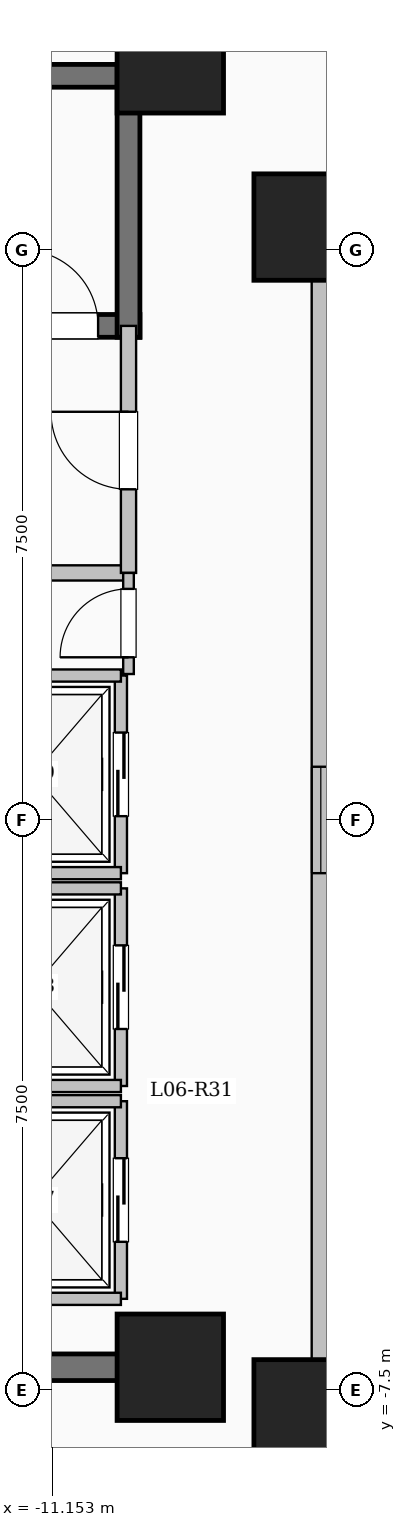
"""IFC4 building model, lengths in metres.
Left out: names, types, materials, properties, quantities, classifications, styles, units other than length and angle.
Written with IfcOpenShell. Run it as: python <this file> out.ifc"""

import sys

from ifc_helpers import new_model, si_unit, direction, frame, frame_2d, origin, origin_2d, place, context, subcontext, project, spatial, rectangle, extrude, element, fill, save


model = new_model("IFC4")
c1 = context("Model", 3, precision=1e-05, world=origin(), true_north=direction((0.0, 1.0)))
c2 = subcontext(c1, "Body", "Model", "MODEL_VIEW")
j1 = project(units=[si_unit("LENGTHUNIT", "METRE"), si_unit("PLANEANGLEUNIT", "RADIAN")], contexts=[c1])
p1 = place(None, origin())
s1 = spatial("IfcSite", under=j1, at=p1, CompositionType="ELEMENT")
p2 = place(p1, origin())
s2 = spatial("IfcBuilding", under=s1, at=p2, CompositionType="ELEMENT")
p3 = place(p2, frame((0.0, 0.0, 27.35)))
s3 = spatial("IfcBuildingStorey", under=s2, at=p3, CompositionType="ELEMENT", Elevation=27.35)
for number, where, z_axis, x_axis in (
    (1, (-7.8, -7.8, 0.0), (0.0, 0.0, 1.0), (1.0, 0.0, 0.0)),
    (2, (-7.8, 7.8, 0.0), (0.0, 0.0, 1.0), (1.0, 0.0, 0.0)),
    (3, (-9.6, -7.2, 0.0), (0.0, 0.0, 1.0), (1.0, 0.0, 0.0)),
    (4, (-9.6, 10.0, 0.0), (0.0, 0.0, 1.0), (1.0, 0.0, 0.0)),
):
    element("IfcColumn", number, at=place(p3, frame(where, z_axis=z_axis, x_axis=x_axis)), inside=s3, PredefinedType="COLUMN", context=c2, shape_type="SweptSolid", body=[
        extrude(rectangle(XDim=1.4, YDim=1.4, at=origin_2d()), origin(), (0.0, 0.0, 1.0), 3.35),
    ])
p4 = place(p3, frame((-7.62, -7.62, 0.0), z_axis=(0.0, 0.0, 1.0), x_axis=(1.0, 0.0, 0.0)))
e5 = element("IfcWall", 5, at=p4, inside=s3, PredefinedType="SOLIDWALL", context=c2, shape_type="SweptSolid", body=[
    extrude(rectangle(XDim=15.24, YDim=0.24, at=frame_2d((7.62, 0.0))), origin(), (0.0, 0.0, 1.0), 3.1),
])
p5 = place(p4, frame((6.92, 0.0, 0.95)))
e6 = element("IfcOpeningElement", 6, at=p5, cuts=e5, PredefinedType="OPENING", context=c2, shape_type="SweptSolid", body=[
    extrude(rectangle(XDim=1.4, YDim=1.5, at=frame_2d((0.7, 0.75))), frame((0.0, 0.13, 0.0), z_axis=(0.0, -1.0, 0.0), x_axis=(1.0, 0.0, 0.0)), (0.0, 0.0, 1.0), 0.26),
])
p6 = place(p3, frame((7.62, 7.62, 0.0), z_axis=(0.0, 0.0, 1.0), x_axis=(-1.0, 0.0, 0.0)))
e7 = element("IfcWall", 7, at=p6, inside=s3, PredefinedType="SOLIDWALL", context=c2, shape_type="SweptSolid", body=[
    extrude(rectangle(XDim=15.24, YDim=0.24, at=frame_2d((7.62, 0.0))), origin(), (0.0, 0.0, 1.0), 3.1),
])
p7 = place(p6, frame((6.92, 0.0, 0.95)))
e8 = element("IfcOpeningElement", 8, at=p7, cuts=e7, PredefinedType="OPENING", context=c2, shape_type="SweptSolid", body=[
    extrude(rectangle(XDim=1.4, YDim=1.5, at=frame_2d((0.7, 0.75))), frame((0.0, 0.13, 0.0), z_axis=(0.0, -1.0, 0.0), x_axis=(1.0, 0.0, 0.0)), (0.0, 0.0, 1.0), 0.26),
])
p8 = place(p3, frame((-7.62, 7.62, 0.0), z_axis=(0.0, 0.0, 1.0), x_axis=(0.0, -1.0, 0.0)))
e9 = element("IfcWall", 9, at=p8, inside=s3, PredefinedType="SOLIDWALL", context=c2, shape_type="SweptSolid", body=[
    extrude(rectangle(XDim=15.24, YDim=0.24, at=frame_2d((7.62, 0.0))), origin(), (0.0, 0.0, 1.0), 3.1),
])
p9 = place(p8, frame((6.92, 0.0, 0.95)))
e10 = element("IfcOpeningElement", 10, at=p9, cuts=e9, PredefinedType="OPENING", context=c2, shape_type="SweptSolid", body=[
    extrude(rectangle(XDim=1.4, YDim=1.5, at=frame_2d((0.7, 0.75))), frame((0.0, 0.13, 0.0), z_axis=(0.0, -1.0, 0.0), x_axis=(1.0, 0.0, 0.0)), (0.0, 0.0, 1.0), 0.26),
])
p10 = place(p3, frame((-18.0, 9.79, 0.0), z_axis=(0.0, 0.0, 1.0), x_axis=(1.0, 0.0, 0.0)))
e11 = element("IfcWall", 11, at=p10, inside=s3, PredefinedType="SHEAR", context=c2, shape_type="SweptSolid", body=[
    extrude(rectangle(XDim=8.0, YDim=0.3, at=frame_2d((4.0, 0.0))), origin(), (0.0, 0.0, 1.0), 3.35),
])
p11 = place(p3, frame((-18.0, 6.5, 0.0), z_axis=(0.0, 0.0, 1.0), x_axis=(1.0, 0.0, 0.0)))
e12 = element("IfcWall", 12, at=p11, inside=s3, PredefinedType="SHEAR", context=c2, shape_type="SweptSolid", body=[
    extrude(rectangle(XDim=8.0, YDim=0.3, at=frame_2d((4.0, 0.0))), origin(), (0.0, 0.0, 1.0), 3.35),
])
p12 = place(p11, frame((6.45, 0.0, 0.0)))
e13 = element("IfcOpeningElement", 13, at=p12, cuts=e12, PredefinedType="OPENING", context=c2, shape_type="SweptSolid", body=[
    extrude(rectangle(XDim=1.0, YDim=2.15, at=frame_2d((0.5, 1.075))), frame((0.0, 0.16, 0.0), z_axis=(0.0, -1.0, 0.0), x_axis=(1.0, 0.0, 0.0)), (0.0, 0.0, 1.0), 0.32),
])
p13 = place(p3, frame((-10.15, 6.35, 0.0), z_axis=(0.0, 0.0, 1.0), x_axis=(0.0, 1.0, 0.0)))
e14 = element("IfcWall", 14, at=p13, inside=s3, PredefinedType="SHEAR", context=c2, shape_type="SweptSolid", body=[
    extrude(rectangle(XDim=3.59, YDim=0.3, at=frame_2d((1.795, 0.0))), origin(), (0.0, 0.0, 1.0), 3.35),
])
p14 = place(p3, frame((-15.55, 3.25, 0.0), z_axis=(0.0, 0.0, 1.0), x_axis=(1.0, 0.0, 0.0)))
e15 = element("IfcWall", 15, at=p14, inside=s3, PredefinedType="SOLIDWALL", context=c2, shape_type="SweptSolid", body=[
    extrude(rectangle(XDim=5.4, YDim=0.2, at=frame_2d((2.7, 0.0))), origin(), (0.0, 0.0, 1.0), 3.1),
])
p15 = place(p3, frame((-10.15, 3.25, 0.0), z_axis=(0.0, 0.0, 1.0), x_axis=(0.0, 1.0, 0.0)))
e16 = element("IfcWall", 16, at=p15, inside=s3, PredefinedType="SOLIDWALL", context=c2, shape_type="SweptSolid", body=[
    extrude(rectangle(XDim=3.25, YDim=0.2, at=frame_2d((1.625, 0.0))), origin(), (0.0, 0.0, 1.0), 3.1),
])
p16 = place(p15, frame((1.1, 0.0, 0.0)))
e17 = element("IfcOpeningElement", 17, at=p16, cuts=e16, PredefinedType="OPENING", context=c2, shape_type="SweptSolid", body=[
    extrude(rectangle(XDim=1.02, YDim=2.15, at=frame_2d((0.51, 1.075))), frame((0.0, 0.11, 0.0), z_axis=(0.0, -1.0, 0.0), x_axis=(1.0, 0.0, 0.0)), (0.0, 0.0, 1.0), 0.22),
])
p17 = place(p3, frame((-10.25, -6.3, 0.0), z_axis=(0.0, 0.0, 1.0), x_axis=(0.0, 1.0, 0.0)))
e18 = element("IfcWall", 18, at=p17, inside=s3, PredefinedType="SOLIDWALL", context=c2, shape_type="SweptSolid", body=[
    extrude(rectangle(XDim=2.6, YDim=0.16, at=frame_2d((1.3, 0.0))), origin(), (0.0, 0.0, 1.0), 3.1),
])
p18 = place(p17, frame((0.75, 0.0, 0.0)))
e19 = element("IfcOpeningElement", 19, at=p18, cuts=e18, PredefinedType="OPENING", context=c2, shape_type="SweptSolid", body=[
    extrude(rectangle(XDim=1.1, YDim=2.15, at=frame_2d((0.55, 1.075))), frame((0.0, 0.09, 0.0), z_axis=(0.0, -1.0, 0.0), x_axis=(1.0, 0.0, 0.0)), (0.0, 0.0, 1.0), 0.18),
])
for number, where, z_axis, x_axis in (
    (20, (-12.55, -6.3, 0.0), (0.0, 0.0, 1.0), (1.0, 0.0, 0.0)),
    (21, (-12.55, -3.7, 0.0), (0.0, 0.0, 1.0), (1.0, 0.0, 0.0)),
):
    element("IfcWall", number, at=place(p3, frame(where, z_axis=z_axis, x_axis=x_axis)), inside=s3, PredefinedType="SOLIDWALL", context=c2, shape_type="SweptSolid", body=[
        extrude(rectangle(XDim=2.3, YDim=0.16, at=frame_2d((1.15, 0.0))), origin(), (0.0, 0.0, 1.0), 3.1),
    ])
p19 = place(p3, frame((-10.25, -3.5, 0.0), z_axis=(0.0, 0.0, 1.0), x_axis=(0.0, 1.0, 0.0)))
e22 = element("IfcWall", 22, at=p19, inside=s3, PredefinedType="SOLIDWALL", context=c2, shape_type="SweptSolid", body=[
    extrude(rectangle(XDim=2.6, YDim=0.16, at=frame_2d((1.3, 0.0))), origin(), (0.0, 0.0, 1.0), 3.1),
])
p20 = place(p19, frame((0.75, 0.0, 0.0)))
e23 = element("IfcOpeningElement", 23, at=p20, cuts=e22, PredefinedType="OPENING", context=c2, shape_type="SweptSolid", body=[
    extrude(rectangle(XDim=1.1, YDim=2.15, at=frame_2d((0.55, 1.075))), frame((0.0, 0.09, 0.0), z_axis=(0.0, -1.0, 0.0), x_axis=(1.0, 0.0, 0.0)), (0.0, 0.0, 1.0), 0.18),
])
for number, where, z_axis, x_axis in (
    (24, (-12.55, -3.5, 0.0), (0.0, 0.0, 1.0), (1.0, 0.0, 0.0)),
    (25, (-12.55, -0.9, 0.0), (0.0, 0.0, 1.0), (1.0, 0.0, 0.0)),
):
    element("IfcWall", number, at=place(p3, frame(where, z_axis=z_axis, x_axis=x_axis)), inside=s3, PredefinedType="SOLIDWALL", context=c2, shape_type="SweptSolid", body=[
        extrude(rectangle(XDim=2.3, YDim=0.16, at=frame_2d((1.15, 0.0))), origin(), (0.0, 0.0, 1.0), 3.1),
    ])
p21 = place(p3, frame((-10.25, -0.7, 0.0), z_axis=(0.0, 0.0, 1.0), x_axis=(0.0, 1.0, 0.0)))
e26 = element("IfcWall", 26, at=p21, inside=s3, PredefinedType="SOLIDWALL", context=c2, shape_type="SweptSolid", body=[
    extrude(rectangle(XDim=2.6, YDim=0.16, at=frame_2d((1.3, 0.0))), origin(), (0.0, 0.0, 1.0), 3.1),
])
p22 = place(p21, frame((0.75, 0.0, 0.0)))
e27 = element("IfcOpeningElement", 27, at=p22, cuts=e26, PredefinedType="OPENING", context=c2, shape_type="SweptSolid", body=[
    extrude(rectangle(XDim=1.1, YDim=2.15, at=frame_2d((0.55, 1.075))), frame((0.0, 0.09, 0.0), z_axis=(0.0, -1.0, 0.0), x_axis=(1.0, 0.0, 0.0)), (0.0, 0.0, 1.0), 0.18),
])
for number, where, z_axis, x_axis in (
    (28, (-12.55, -0.7, 0.0), (0.0, 0.0, 1.0), (1.0, 0.0, 0.0)),
    (29, (-12.55, 1.9, 0.0), (0.0, 0.0, 1.0), (1.0, 0.0, 0.0)),
):
    element("IfcWall", number, at=place(p3, frame(where, z_axis=z_axis, x_axis=x_axis)), inside=s3, PredefinedType="SOLIDWALL", context=c2, shape_type="SweptSolid", body=[
        extrude(rectangle(XDim=2.3, YDim=0.16, at=frame_2d((1.15, 0.0))), origin(), (0.0, 0.0, 1.0), 3.1),
    ])
p23 = place(p3, frame((-18.625, -7.2, 0.0), z_axis=(0.0, 0.0, 1.0), x_axis=(1.0, 0.0, 0.0)))
e30 = element("IfcWall", 30, at=p23, inside=s3, PredefinedType="SHEAR", context=c2, shape_type="SweptSolid", body=[
    extrude(rectangle(XDim=8.55, YDim=0.35, at=frame_2d((4.275, 0.0))), origin(), (0.0, 0.0, 1.0), 3.35),
])
p24 = place(p3, frame((-10.15, 1.92, 0.0), z_axis=(0.0, 0.0, 1.0), x_axis=(0.0, 1.0, 0.0)))
e31 = element("IfcWall", 31, at=p24, inside=s3, PredefinedType="PARTITIONING", context=c2, shape_type="SweptSolid", body=[
    extrude(rectangle(XDim=1.33, YDim=0.14, at=frame_2d((0.665, 0.0))), origin(), (0.0, 0.0, 1.0), 3.1),
])
p25 = place(p24, frame((0.22, 0.0, 0.0)))
e32 = element("IfcOpeningElement", 32, at=p25, cuts=e31, PredefinedType="OPENING", context=c2, shape_type="SweptSolid", body=[
    extrude(rectangle(XDim=0.9, YDim=2.08, at=frame_2d((0.45, 1.04))), frame((0.0, 0.08, 0.0), z_axis=(0.0, -1.0, 0.0), x_axis=(1.0, 0.0, 0.0)), (0.0, 0.0, 1.0), 0.16),
])
p26 = place(p9, origin())
e33 = element("IfcWindow", 33, at=p26, inside=s3, PartitioningType="SINGLE_PANEL", PredefinedType="WINDOW", context=c2, shape_type="SweptSolid", body=[
    extrude(rectangle(XDim=1.4, YDim=1.5, at=frame_2d((0.7, 0.75))), frame((0.0, 0.03, 0.0), z_axis=(0.0, -1.0, 0.0), x_axis=(1.0, 0.0, 0.0)), (0.0, 0.0, 1.0), 0.06),
])
fill(e10, e33)
p27 = place(p12, origin())
e34 = element("IfcDoor", 34, at=p27, inside=s3, OperationType="SINGLE_SWING_LEFT", PredefinedType="DOOR", context=c2, shape_type="SweptSolid", body=[
    extrude(rectangle(XDim=1.0, YDim=2.15, at=frame_2d((0.5, 1.075))), frame((0.0, 0.025, 0.0), z_axis=(0.0, -1.0, 0.0), x_axis=(1.0, 0.0, 0.0)), (0.0, 0.0, 1.0), 0.05),
])
fill(e13, e34)
p28 = place(p16, origin())
e35 = element("IfcDoor", 35, at=p28, inside=s3, OperationType="SINGLE_SWING_RIGHT", PredefinedType="DOOR", context=c2, shape_type="SweptSolid", body=[
    extrude(rectangle(XDim=1.02, YDim=2.15, at=frame_2d((0.51, 1.075))), frame((0.0, 0.025, 0.0), z_axis=(0.0, -1.0, 0.0), x_axis=(1.0, 0.0, 0.0)), (0.0, 0.0, 1.0), 0.05),
])
fill(e17, e35)
p29 = place(p18, origin())
e36 = element("IfcDoor", 36, at=p29, inside=s3, OperationType="SLIDING_TO_LEFT", PredefinedType="DOOR", context=c2, shape_type="SweptSolid", body=[
    extrude(rectangle(XDim=1.1, YDim=2.15, at=frame_2d((0.55, 1.075))), frame((0.0, 0.025, 0.0), z_axis=(0.0, -1.0, 0.0), x_axis=(1.0, 0.0, 0.0)), (0.0, 0.0, 1.0), 0.05),
])
fill(e19, e36)
p30 = place(p20, origin())
e37 = element("IfcDoor", 37, at=p30, inside=s3, OperationType="SLIDING_TO_LEFT", PredefinedType="DOOR", context=c2, shape_type="SweptSolid", body=[
    extrude(rectangle(XDim=1.1, YDim=2.15, at=frame_2d((0.55, 1.075))), frame((0.0, 0.025, 0.0), z_axis=(0.0, -1.0, 0.0), x_axis=(1.0, 0.0, 0.0)), (0.0, 0.0, 1.0), 0.05),
])
fill(e23, e37)
p31 = place(p22, origin())
e38 = element("IfcDoor", 38, at=p31, inside=s3, OperationType="SLIDING_TO_LEFT", PredefinedType="DOOR", context=c2, shape_type="SweptSolid", body=[
    extrude(rectangle(XDim=1.1, YDim=2.15, at=frame_2d((0.55, 1.075))), frame((0.0, 0.025, 0.0), z_axis=(0.0, -1.0, 0.0), x_axis=(1.0, 0.0, 0.0)), (0.0, 0.0, 1.0), 0.05),
])
fill(e27, e38)
p32 = place(p25, origin())
e39 = element("IfcDoor", 39, at=p32, inside=s3, OperationType="SINGLE_SWING_LEFT", PredefinedType="DOOR", context=c2, shape_type="SweptSolid", body=[
    extrude(rectangle(XDim=0.9, YDim=2.08, at=frame_2d((0.45, 1.04))), frame((0.0, 0.025, 0.0), z_axis=(0.0, -1.0, 0.0), x_axis=(1.0, 0.0, 0.0)), (0.0, 0.0, 1.0), 0.05),
])
fill(e32, e39)
save(model, sys.argv[1])
